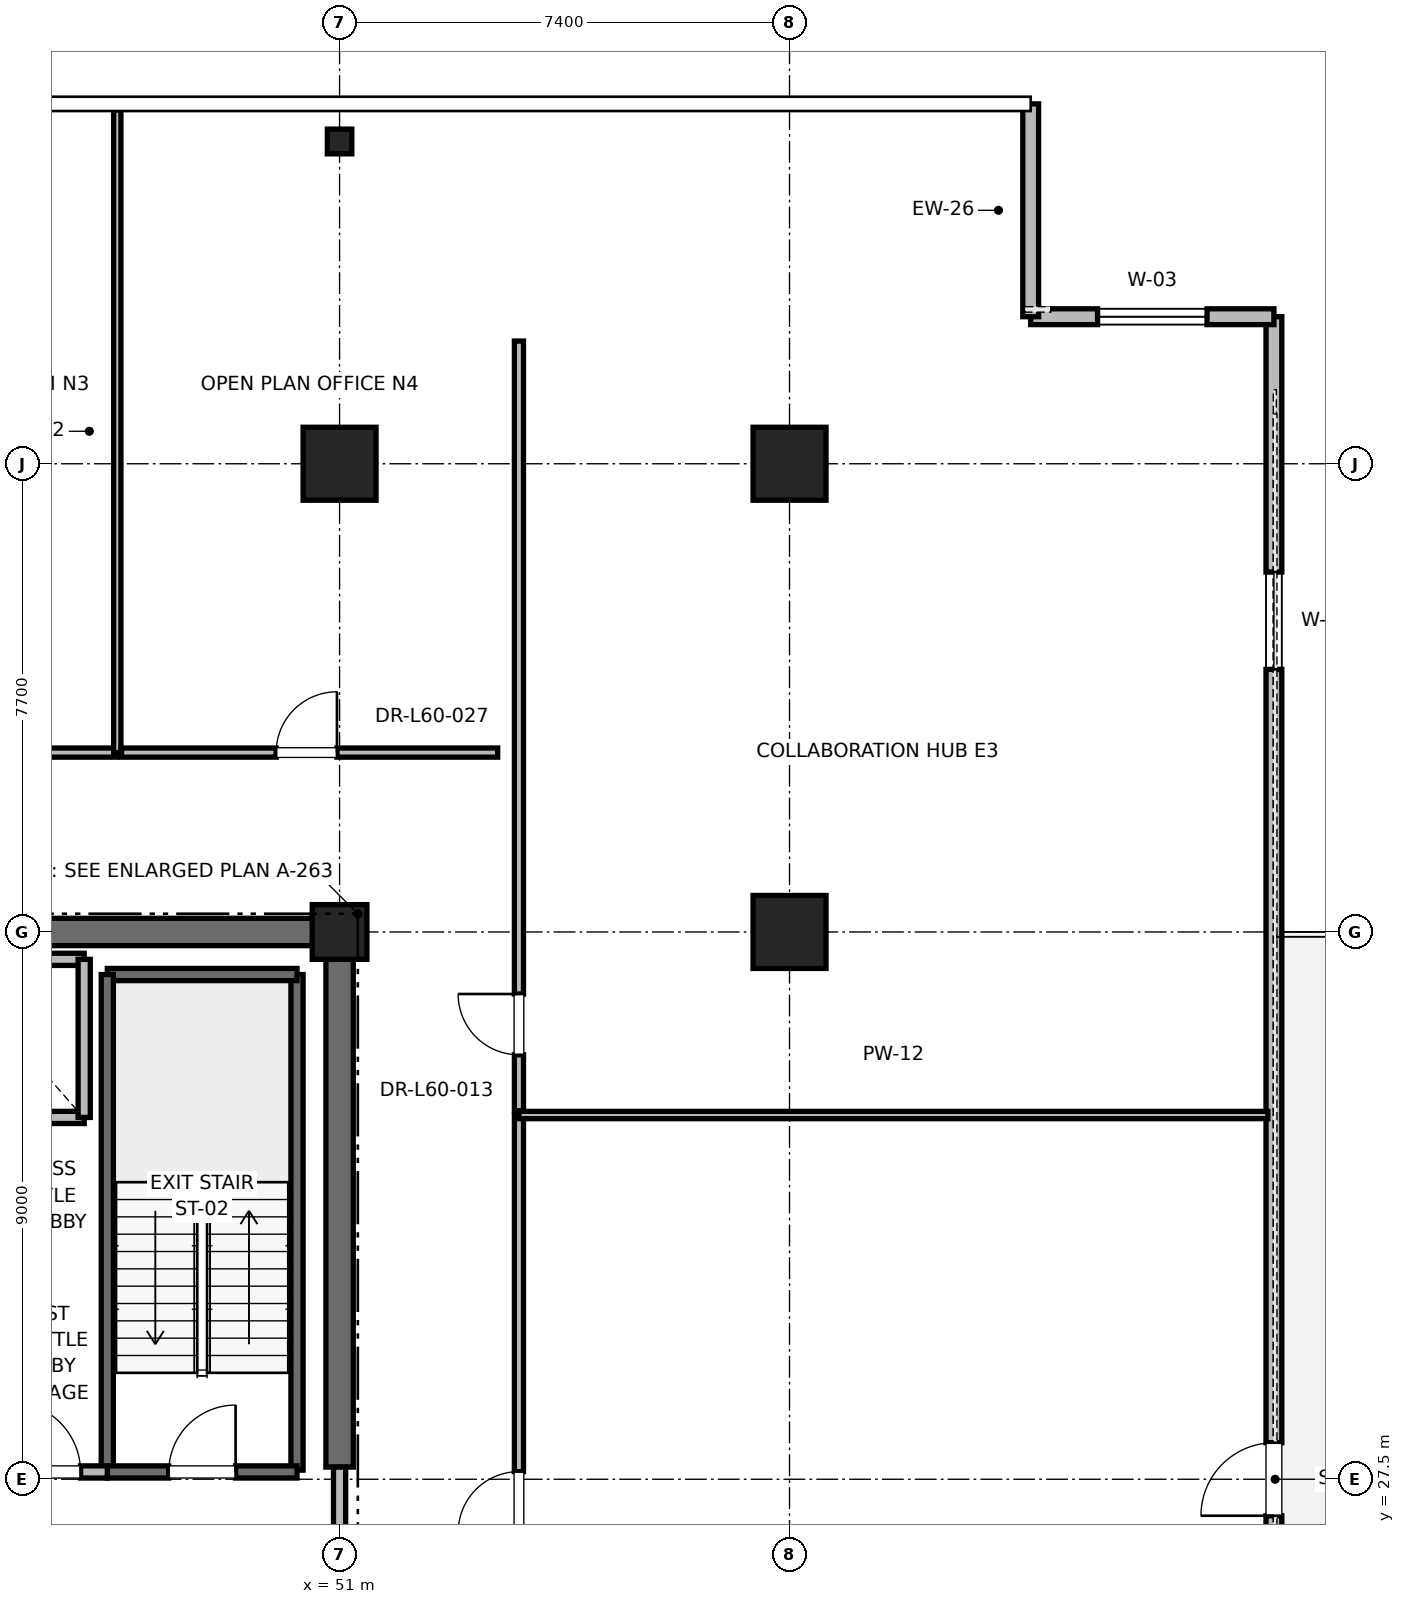
"""IFC4 building model, lengths in metres.
Left out: names, types, materials, properties, quantities, classifications, styles, units other than length and angle.
Written with IfcOpenShell. Run it as: python <this file> out.ifc"""

import sys

from ifc_helpers import new_model, si_unit, direction, frame, frame_2d, origin, origin_2d, place, context, subcontext, project, spatial, rectangle, i_section, extrude, element, fill, save


model = new_model("IFC4")
c1 = context("Model", 3, precision=1e-05, world=origin(), true_north=direction((0.0, 1.0)))
c2 = subcontext(c1, "Body", "Model", "MODEL_VIEW")
j1 = project(units=[si_unit("LENGTHUNIT", "METRE"), si_unit("PLANEANGLEUNIT", "RADIAN")], contexts=[c1])
p1 = place(None, origin())
s1 = spatial("IfcSite", under=j1, at=p1, CompositionType="ELEMENT")
p2 = place(p1, origin())
s2 = spatial("IfcBuilding", under=s1, at=p2, CompositionType="ELEMENT")
p3 = place(p2, frame((0.0, 0.0, 259.2)))
s3 = spatial("IfcBuildingStorey", under=s2, at=p3, CompositionType="ELEMENT", Elevation=259.2)
for number, where, z_axis, x_axis in (
    (1, (51.0, 44.2, 0.0), (0.0, 0.0, 1.0), (1.0, 0.0, 0.0)),
    (2, (58.4, 36.5, 0.0), (0.0, 0.0, 1.0), (1.0, 0.0, 0.0)),
    (3, (58.4, 44.2, 0.0), (0.0, 0.0, 1.0), (1.0, 0.0, 0.0)),
):
    element("IfcColumn", number, at=place(p3, frame(where, z_axis=z_axis, x_axis=x_axis)), inside=s3, PredefinedType="COLUMN", context=c2, shape_type="SweptSolid", body=[
        extrude(rectangle(XDim=1.2, YDim=1.2, at=origin_2d()), origin(), (0.0, 0.0, 1.0), 4.0),
    ])
p4 = place(p3, frame((51.0, 49.5, 0.0), z_axis=(0.0, 0.0, 1.0), x_axis=(1.0, 0.0, 0.0)))
e4 = element("IfcColumn", 4, at=p4, inside=s3, PredefinedType="COLUMN", context=c2, shape_type="SweptSolid", body=[
    extrude(i_section(OverallWidth=0.403, OverallDepth=0.406, WebThickness=0.027, FlangeThickness=0.043, FilletRadius=0.015, at=origin_2d()), origin(), (0.0, 0.0, 1.0), 4.0),
])
p5 = place(p3, frame((51.0, 36.5, 0.0), z_axis=(0.0, 0.0, 1.0), x_axis=(1.0, 0.0, 0.0)))
e5 = element("IfcColumn", 5, at=p5, inside=s3, PredefinedType="PILASTER", context=c2, shape_type="SweptSolid", body=[
    extrude(rectangle(XDim=0.9, YDim=0.9, at=origin_2d()), origin(), (0.0, 0.0, 1.0), 4.0),
])
p6 = place(p3, frame((45.2, 36.5, 0.0), z_axis=(0.0, 0.0, 1.0), x_axis=(1.0, 0.0, 0.0)))
e6 = element("IfcWall", 6, at=p6, inside=s3, PredefinedType="SHEAR", context=c2, shape_type="SweptSolid", body=[
    extrude(rectangle(XDim=5.8, YDim=0.45, at=frame_2d((2.9, 0.0))), origin(), (0.0, 0.0, 1.0), 3.785),
])
p7 = place(p3, frame((51.0, 27.7, 0.0), z_axis=(0.0, 0.0, 1.0), x_axis=(0.0, 1.0, 0.0)))
e7 = element("IfcWall", 7, at=p7, inside=s3, PredefinedType="SHEAR", context=c2, shape_type="SweptSolid", body=[
    extrude(rectangle(XDim=8.8, YDim=0.45, at=frame_2d((4.4, 0.0))), origin(), (0.0, 0.0, 1.0), 3.785),
])
p8 = place(p3, frame((66.366, 8.382, 0.0), z_axis=(0.0, 0.0, 1.0), x_axis=(0.0, 1.0, 0.0)))
e8 = element("IfcWall", 8, at=p8, inside=s3, PredefinedType="PARAPET", context=c2, shape_type="SweptSolid", body=[
    extrude(rectangle(XDim=38.236, YDim=0.26, at=frame_2d((19.118, 0.0))), origin(), (0.0, 0.0, 1.0), 3.123),
])
p9 = place(p8, frame((4.2, 0.0, 0.85)))
e9 = element("IfcOpeningElement", 9, at=p9, cuts=e8, PredefinedType="OPENING", context=c2, shape_type="SweptSolid", body=[
    extrude(rectangle(XDim=1.6, YDim=2.1, at=frame_2d((0.8, 1.05))), frame((0.0, 0.13, 0.0), z_axis=(0.0, -1.0, 0.0), x_axis=(1.0, 0.0, 0.0)), (0.0, 0.0, 1.0), 0.26),
])
p10 = place(p8, frame((18.518, 0.0, 0.0)))
e10 = element("IfcOpeningElement", 10, at=p10, cuts=e8, PredefinedType="OPENING", context=c2, shape_type="SweptSolid", body=[
    extrude(rectangle(XDim=1.2, YDim=2.2, at=frame_2d((0.6, 1.1))), frame((0.0, 0.13, 0.0), z_axis=(0.0, -1.0, 0.0), x_axis=(1.0, 0.0, 0.0)), (0.0, 0.0, 1.0), 0.26),
])
p11 = place(p8, frame((32.436, 0.0, 0.85)))
e11 = element("IfcOpeningElement", 11, at=p11, cuts=e8, PredefinedType="OPENING", context=c2, shape_type="SweptSolid", body=[
    extrude(rectangle(XDim=1.6, YDim=2.1, at=frame_2d((0.8, 1.05))), frame((0.0, 0.13, 0.0), z_axis=(0.0, -1.0, 0.0), x_axis=(1.0, 0.0, 0.0)), (0.0, 0.0, 1.0), 0.26),
])
p12 = place(p3, frame((66.366, 46.618, 0.0), z_axis=(0.0, 0.0, 1.0), x_axis=(-1.0, 0.0, 0.0)))
e12 = element("IfcWall", 12, at=p12, inside=s3, PredefinedType="PARAPET", context=c2, shape_type="SweptSolid", body=[
    extrude(rectangle(XDim=4.0, YDim=0.26, at=frame_2d((2.0, 0.0))), origin(), (0.0, 0.0, 1.0), 3.785),
])
p13 = place(p12, frame((1.1, 0.0, 0.85)))
e13 = element("IfcOpeningElement", 13, at=p13, cuts=e12, PredefinedType="OPENING", context=c2, shape_type="SweptSolid", body=[
    extrude(rectangle(XDim=1.8, YDim=2.2, at=frame_2d((0.9, 1.1))), frame((0.0, 0.13, 0.0), z_axis=(0.0, -1.0, 0.0), x_axis=(1.0, 0.0, 0.0)), (0.0, 0.0, 1.0), 0.26),
])
p14 = place(p3, frame((62.366, 46.618, 0.0), z_axis=(0.0, 0.0, 1.0), x_axis=(0.0, 1.0, 0.0)))
e14 = element("IfcWall", 14, at=p14, inside=s3, PredefinedType="PARAPET", context=c2, shape_type="SweptSolid", body=[
    extrude(rectangle(XDim=3.5, YDim=0.26, at=frame_2d((1.75, 0.0))), origin(), (0.0, 0.0, 1.0), 3.785),
])
p15 = place(p3, frame((50.3, 27.65, 0.0), z_axis=(0.0, 0.0, 1.0), x_axis=(0.0, 1.0, 0.0)))
e15 = element("IfcWall", 15, at=p15, inside=s3, PredefinedType="SOLIDWALL", context=c2, shape_type="SweptSolid", body=[
    extrude(rectangle(XDim=8.15, YDim=0.2, at=frame_2d((4.075, 0.0))), origin(), (0.0, 0.0, 1.0), 3.785),
])
p16 = place(p3, frame((47.18, 35.8, 0.0), z_axis=(0.0, 0.0, 1.0), x_axis=(1.0, 0.0, 0.0)))
e16 = element("IfcWall", 16, at=p16, inside=s3, PredefinedType="SOLIDWALL", context=c2, shape_type="SweptSolid", body=[
    extrude(rectangle(XDim=3.12, YDim=0.2, at=frame_2d((1.56, 0.0))), origin(), (0.0, 0.0, 1.0), 3.785),
])
p17 = place(p3, frame((47.18, 27.62, 0.0), z_axis=(0.0, 0.0, 1.0), x_axis=(0.0, 1.0, 0.0)))
e17 = element("IfcWall", 17, at=p17, inside=s3, PredefinedType="SOLIDWALL", context=c2, shape_type="SweptSolid", body=[
    extrude(rectangle(XDim=8.18, YDim=0.2, at=frame_2d((4.09, 0.0))), origin(), (0.0, 0.0, 1.0), 3.785),
])
p18 = place(p3, frame((47.18, 27.62, 0.0), z_axis=(0.0, 0.0, 1.0), x_axis=(1.0, 0.0, 0.0)))
e18 = element("IfcWall", 18, at=p18, inside=s3, PredefinedType="SOLIDWALL", context=c2, shape_type="SweptSolid", body=[
    extrude(rectangle(XDim=3.12, YDim=0.2, at=frame_2d((1.56, 0.0))), origin(), (0.0, 0.0, 1.0), 3.785),
])
p19 = place(p18, frame((1.01, 0.0, 0.0)))
e19 = element("IfcOpeningElement", 19, at=p19, cuts=e18, PredefinedType="OPENING", context=c2, shape_type="SweptSolid", body=[
    extrude(rectangle(XDim=1.1, YDim=2.15, at=frame_2d((0.55, 1.075))), frame((0.0, 0.1, 0.0), z_axis=(0.0, -1.0, 0.0), x_axis=(1.0, 0.0, 0.0)), (0.0, 0.0, 1.0), 0.2),
])
p20 = place(p3, frame((45.15, 27.62, 0.0), z_axis=(0.0, 0.0, 1.0), x_axis=(1.0, 0.0, 0.0)))
e20 = element("IfcWall", 20, at=p20, inside=s3, PredefinedType="PARTITIONING", context=c2, shape_type="SweptSolid", body=[
    extrude(rectangle(XDim=2.03, YDim=0.2, at=frame_2d((1.015, 0.0))), origin(), (0.0, 0.0, 1.0), 3.785),
])
p21 = place(p20, frame((0.44, 0.0, 0.0)))
e21 = element("IfcOpeningElement", 21, at=p21, cuts=e20, PredefinedType="OPENING", context=c2, shape_type="SweptSolid", body=[
    extrude(rectangle(XDim=1.15, YDim=2.2, at=frame_2d((0.575, 1.1))), frame((0.0, 0.1, 0.0), z_axis=(0.0, -1.0, 0.0), x_axis=(1.0, 0.0, 0.0)), (0.0, 0.0, 1.0), 0.2),
])
p22 = place(p3, frame((51.0, 24.3, 0.0), z_axis=(0.0, 0.0, 1.0), x_axis=(0.0, 1.0, 0.0)))
e22 = element("IfcWall", 22, at=p22, inside=s3, PredefinedType="PARTITIONING", context=c2, shape_type="SweptSolid", body=[
    extrude(rectangle(XDim=3.4, YDim=0.2, at=frame_2d((1.7, 0.0))), origin(), (0.0, 0.0, 1.0), 2.865),
])
p23 = place(p22, frame((1.125, 0.0, 0.0)))
e23 = element("IfcOpeningElement", 23, at=p23, cuts=e22, PredefinedType="OPENING", context=c2, shape_type="SweptSolid", body=[
    extrude(rectangle(XDim=1.15, YDim=2.2, at=frame_2d((0.575, 1.1))), frame((0.0, 0.1, 0.0), z_axis=(0.0, -1.0, 0.0), x_axis=(1.0, 0.0, 0.0)), (0.0, 0.0, 1.0), 0.2),
])
p24 = place(p3, frame((44.5, 33.45, 0.0), z_axis=(0.0, 0.0, 1.0), x_axis=(1.0, 0.0, 0.0)))
e24 = element("IfcWall", 24, at=p24, inside=s3, PredefinedType="SOLIDWALL", context=c2, shape_type="SweptSolid", body=[
    extrude(rectangle(XDim=2.3, YDim=0.2, at=frame_2d((1.15, 0.0))), origin(), (0.0, 0.0, 1.0), 3.785),
])
p25 = place(p3, frame((46.8, 36.05, 0.0), z_axis=(0.0, 0.0, 1.0), x_axis=(-1.0, 0.0, 0.0)))
e25 = element("IfcWall", 25, at=p25, inside=s3, PredefinedType="SOLIDWALL", context=c2, shape_type="SweptSolid", body=[
    extrude(rectangle(XDim=2.3, YDim=0.2, at=frame_2d((1.15, 0.0))), origin(), (0.0, 0.0, 1.0), 2.865),
])
p26 = place(p3, frame((46.8, 33.45, 0.0), z_axis=(0.0, 0.0, 1.0), x_axis=(0.0, 1.0, 0.0)))
e26 = element("IfcWall", 26, at=p26, inside=s3, PredefinedType="SOLIDWALL", context=c2, shape_type="SweptSolid", body=[
    extrude(rectangle(XDim=2.6, YDim=0.2, at=frame_2d((1.3, 0.0))), origin(), (0.0, 0.0, 1.0), 3.785),
])
p27 = place(p3, frame((41.158, 39.45, 0.0), z_axis=(0.0, 0.0, 1.0), x_axis=(1.0, 0.0, 0.0)))
e27 = element("IfcWall", 27, at=p27, inside=s3, PredefinedType="PARTITIONING", context=c2, shape_type="SweptSolid", body=[
    extrude(rectangle(XDim=6.186, YDim=0.15, at=frame_2d((3.093, 0.0))), origin(), (0.0, 0.0, 1.0), 2.85),
])
p28 = place(p27, frame((2.558, 0.0, 0.0)))
e28 = element("IfcOpeningElement", 28, at=p28, cuts=e27, PredefinedType="OPENING", context=c2, shape_type="SweptSolid", body=[
    extrude(rectangle(XDim=1.0, YDim=2.15, at=frame_2d((0.5, 1.075))), frame((0.0, 0.075, 0.0), z_axis=(0.0, -1.0, 0.0), x_axis=(1.0, 0.0, 0.0)), (0.0, 0.0, 1.0), 0.15),
])
p29 = place(p3, frame((47.344, 39.45, 0.0), z_axis=(0.0, 0.0, 1.0), x_axis=(0.0, 1.0, 0.0)))
e29 = element("IfcWall", 29, at=p29, inside=s3, PredefinedType="PARTITIONING", context=c2, shape_type="SweptSolid", body=[
    extrude(rectangle(XDim=10.568, YDim=0.12, at=frame_2d((5.284, 0.0))), origin(), (0.0, 0.0, 1.0), 2.415),
])
p30 = place(p3, frame((47.414, 39.45, 0.0), z_axis=(0.0, 0.0, 1.0), x_axis=(1.0, 0.0, 0.0)))
e30 = element("IfcWall", 30, at=p30, inside=s3, PredefinedType="PARTITIONING", context=c2, shape_type="SweptSolid", body=[
    extrude(rectangle(XDim=6.186, YDim=0.15, at=frame_2d((3.093, 0.0))), origin(), (0.0, 0.0, 1.0), 2.85),
])
p31 = place(p30, frame((2.543, 0.0, 0.0)))
e31 = element("IfcOpeningElement", 31, at=p31, cuts=e30, PredefinedType="OPENING", context=c2, shape_type="SweptSolid", body=[
    extrude(rectangle(XDim=1.0, YDim=2.15, at=frame_2d((0.5, 1.075))), frame((0.0, 0.075, 0.0), z_axis=(0.0, -1.0, 0.0), x_axis=(1.0, 0.0, 0.0)), (0.0, 0.0, 1.0), 0.15),
])
p32 = place(p3, frame((53.95, 20.831, 0.0), z_axis=(0.0, 0.0, 1.0), x_axis=(0.0, 1.0, 0.0)))
e32 = element("IfcWall", 32, at=p32, inside=s3, PredefinedType="PARTITIONING", context=c2, shape_type="SweptSolid", body=[
    extrude(rectangle(XDim=12.658, YDim=0.15, at=frame_2d((6.329, 0.0))), origin(), (0.0, 0.0, 1.0), 2.85),
])
p33 = place(p32, frame((5.794, 0.0, 0.0)))
e33 = element("IfcOpeningElement", 33, at=p33, cuts=e32, PredefinedType="OPENING", context=c2, shape_type="SweptSolid", body=[
    extrude(rectangle(XDim=1.0, YDim=2.15, at=frame_2d((0.5, 1.075))), frame((0.0, 0.075, 0.0), z_axis=(0.0, -1.0, 0.0), x_axis=(1.0, 0.0, 0.0)), (0.0, 0.0, 1.0), 0.15),
])
p34 = place(p3, frame((53.95, 33.49, 0.0), z_axis=(0.0, 0.0, 1.0), x_axis=(1.0, 0.0, 0.0)))
e34 = element("IfcWall", 34, at=p34, inside=s3, PredefinedType="PARTITIONING", context=c2, shape_type="SweptSolid", body=[
    extrude(rectangle(XDim=12.317, YDim=0.12, at=frame_2d((6.158, 0.0))), origin(), (0.0, 0.0, 1.0), 2.85),
])
p35 = place(p3, frame((53.95, 33.56, 0.0), z_axis=(0.0, 0.0, 1.0), x_axis=(0.0, 1.0, 0.0)))
e35 = element("IfcWall", 35, at=p35, inside=s3, PredefinedType="PARTITIONING", context=c2, shape_type="SweptSolid", body=[
    extrude(rectangle(XDim=12.658, YDim=0.15, at=frame_2d((6.329, 0.0))), origin(), (0.0, 0.0, 1.0), 2.85),
])
p36 = place(p35, frame((0.92, 0.0, 0.0)))
e36 = element("IfcOpeningElement", 36, at=p36, cuts=e35, PredefinedType="OPENING", context=c2, shape_type="SweptSolid", body=[
    extrude(rectangle(XDim=1.0, YDim=2.15, at=frame_2d((0.5, 1.075))), frame((0.0, 0.075, 0.0), z_axis=(0.0, -1.0, 0.0), x_axis=(1.0, 0.0, 0.0)), (0.0, 0.0, 1.0), 0.15),
])
p37 = place(p10, origin())
e37 = element("IfcDoor", 37, at=p37, inside=s3, OperationType="SINGLE_SWING_LEFT", PredefinedType="DOOR", context=c2, shape_type="SweptSolid", body=[
    extrude(rectangle(XDim=1.2, YDim=2.2, at=frame_2d((0.6, 1.1))), frame((0.0, 0.025, 0.0), z_axis=(0.0, -1.0, 0.0), x_axis=(1.0, 0.0, 0.0)), (0.0, 0.0, 1.0), 0.05),
])
fill(e10, e37)
p38 = place(p11, origin())
e38 = element("IfcWindow", 38, at=p38, inside=s3, PartitioningType="SINGLE_PANEL", PredefinedType="WINDOW", context=c2, shape_type="SweptSolid", body=[
    extrude(rectangle(XDim=1.6, YDim=2.1, at=frame_2d((0.8, 1.05))), frame((0.0, 0.03, 0.0), z_axis=(0.0, -1.0, 0.0), x_axis=(1.0, 0.0, 0.0)), (0.0, 0.0, 1.0), 0.06),
])
fill(e11, e38)
p39 = place(p13, origin())
e39 = element("IfcWindow", 39, at=p39, inside=s3, PartitioningType="SINGLE_PANEL", PredefinedType="WINDOW", context=c2, shape_type="SweptSolid", body=[
    extrude(rectangle(XDim=1.8, YDim=2.2, at=frame_2d((0.9, 1.1))), frame((0.0, 0.03, 0.0), z_axis=(0.0, -1.0, 0.0), x_axis=(1.0, 0.0, 0.0)), (0.0, 0.0, 1.0), 0.06),
])
fill(e13, e39)
p40 = place(p19, origin())
e40 = element("IfcDoor", 40, at=p40, inside=s3, OperationType="SINGLE_SWING_RIGHT", PredefinedType="DOOR", context=c2, shape_type="SweptSolid", body=[
    extrude(rectangle(XDim=1.1, YDim=2.15, at=frame_2d((0.55, 1.075))), frame((0.0, 0.025, 0.0), z_axis=(0.0, -1.0, 0.0), x_axis=(1.0, 0.0, 0.0)), (0.0, 0.0, 1.0), 0.05),
])
fill(e19, e40)
p41 = place(p21, origin())
e41 = element("IfcDoor", 41, at=p41, inside=s3, OperationType="SINGLE_SWING_LEFT", PredefinedType="DOOR", context=c2, shape_type="SweptSolid", body=[
    extrude(rectangle(XDim=1.15, YDim=2.2, at=frame_2d((0.575, 1.1))), frame((0.0, 0.025, 0.0), z_axis=(0.0, -1.0, 0.0), x_axis=(1.0, 0.0, 0.0)), (0.0, 0.0, 1.0), 0.05),
])
fill(e21, e41)
p42 = place(p31, origin())
e42 = element("IfcDoor", 42, at=p42, inside=s3, OperationType="SINGLE_SWING_RIGHT", PredefinedType="DOOR", context=c2, shape_type="SweptSolid", body=[
    extrude(rectangle(XDim=1.0, YDim=2.15, at=frame_2d((0.5, 1.075))), frame((0.0, 0.025, 0.0), z_axis=(0.0, -1.0, 0.0), x_axis=(1.0, 0.0, 0.0)), (0.0, 0.0, 1.0), 0.05),
])
fill(e31, e42)
p43 = place(p33, origin())
e43 = element("IfcDoor", 43, at=p43, inside=s3, OperationType="SINGLE_SWING_LEFT", PredefinedType="DOOR", context=c2, shape_type="SweptSolid", body=[
    extrude(rectangle(XDim=1.0, YDim=2.15, at=frame_2d((0.5, 1.075))), frame((0.0, 0.025, 0.0), z_axis=(0.0, -1.0, 0.0), x_axis=(1.0, 0.0, 0.0)), (0.0, 0.0, 1.0), 0.05),
])
fill(e33, e43)
p44 = place(p36, origin())
e44 = element("IfcDoor", 44, at=p44, inside=s3, OperationType="SINGLE_SWING_RIGHT", PredefinedType="DOOR", context=c2, shape_type="SweptSolid", body=[
    extrude(rectangle(XDim=1.0, YDim=2.15, at=frame_2d((0.5, 1.075))), frame((0.0, 0.025, 0.0), z_axis=(0.0, -1.0, 0.0), x_axis=(1.0, 0.0, 0.0)), (0.0, 0.0, 1.0), 0.05),
])
fill(e36, e44)
save(model, sys.argv[1])
